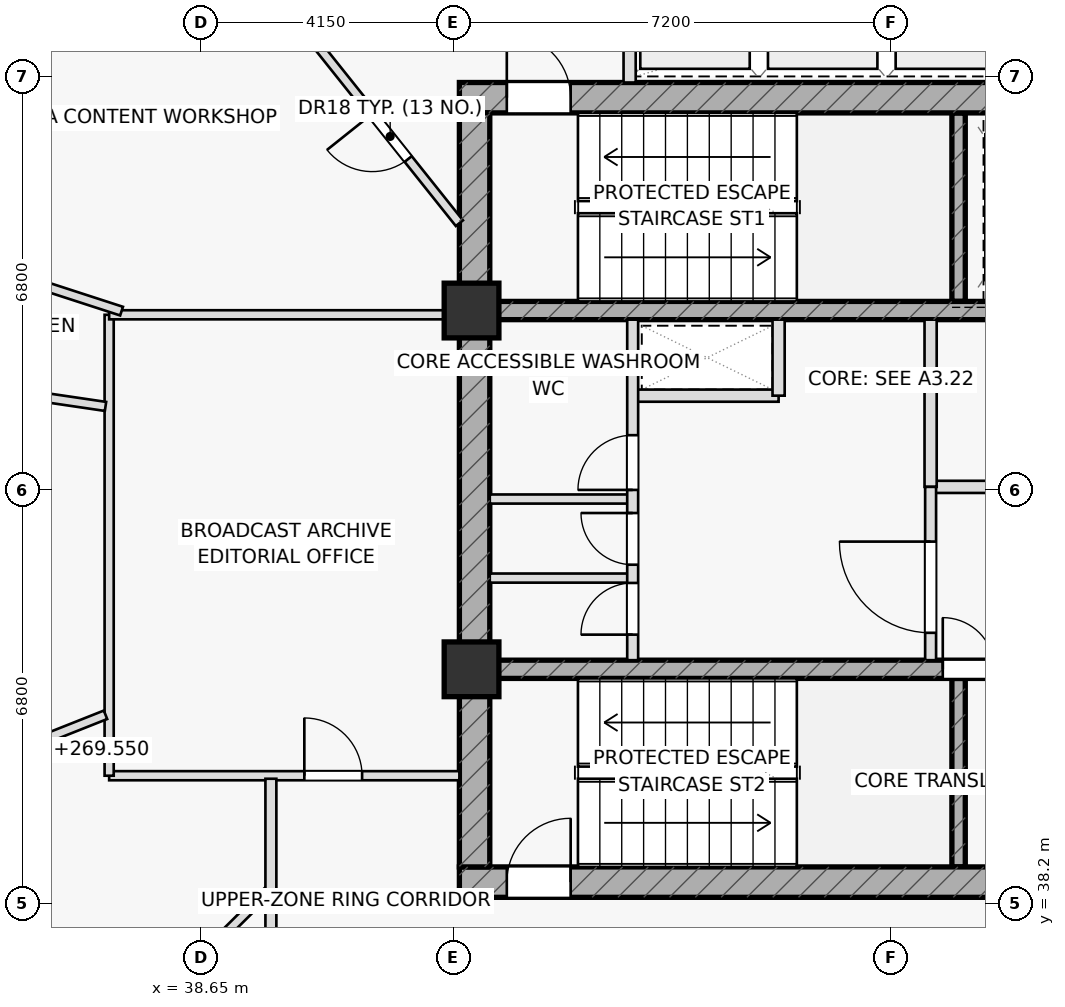
"""IFC4 building model, lengths in metres.
Left out: names, types, materials, properties, quantities, classifications, styles, units other than length and angle.
Written with IfcOpenShell. Run it as: python <this file> out.ifc"""

import sys

from ifc_helpers import new_model, si_unit, direction, frame, frame_2d, origin, origin_2d, place, context, subcontext, project, spatial, rectangle, extrude, element, fill, save


model = new_model("IFC4")
c1 = context("Model", 3, precision=1e-05, world=origin(), true_north=direction((0.0, 1.0)))
c2 = subcontext(c1, "Body", "Model", "MODEL_VIEW")
j1 = project(units=[si_unit("LENGTHUNIT", "METRE"), si_unit("PLANEANGLEUNIT", "RADIAN")], contexts=[c1])
p1 = place(None, origin())
s1 = spatial("IfcSite", under=j1, at=p1, CompositionType="ELEMENT")
p2 = place(p1, origin())
s2 = spatial("IfcBuilding", under=s1, at=p2, CompositionType="ELEMENT")
p3 = place(p2, frame((0.0, 0.0, 269.55)))
s3 = spatial("IfcBuildingStorey", under=s2, at=p3, CompositionType="ELEMENT", Elevation=269.55)
for number, where, z_axis, x_axis in (
    (1, (51.11, 48.1, 0.0), (0.0, 0.0, 1.0), (0.0, 1.0, 0.0)),
    (2, (51.11, 38.8, 0.0), (0.0, 0.0, 1.0), (0.0, 1.0, 0.0)),
):
    element("IfcWall", number, at=place(p3, frame(where, z_axis=z_axis, x_axis=x_axis)), inside=s3, PredefinedType="SHEAR", context=c2, shape_type="SweptSolid", body=[
        extrude(rectangle(XDim=3.1, YDim=0.22, at=frame_2d((1.55, 0.0))), origin(), (0.0, 0.0, 1.0), 3.5),
    ])
p4 = place(p3, frame((42.9, 51.45, 0.0), z_axis=(0.0, 0.0, 1.0), x_axis=(1.0, 0.0, 0.0)))
e3 = element("IfcWall", 3, at=p4, inside=s3, PredefinedType="SHEAR", context=c2, shape_type="SweptSolid", body=[
    extrude(rectangle(XDim=14.2, YDim=0.5, at=frame_2d((7.1, 0.0))), origin(), (0.0, 0.0, 1.0), 3.5),
])
p5 = place(p4, frame((0.78, 0.0, 0.0)))
e4 = element("IfcOpeningElement", 4, at=p5, cuts=e3, PredefinedType="OPENING", context=c2, shape_type="SweptSolid", body=[
    extrude(rectangle(XDim=1.05, YDim=2.2, at=frame_2d((0.525, 1.1))), frame((0.0, 0.26, 0.0), z_axis=(0.0, -1.0, 0.0), x_axis=(1.0, 0.0, 0.0)), (0.0, 0.0, 1.0), 0.52),
])
p6 = place(p3, frame((42.9, 38.55, 0.0), z_axis=(0.0, 0.0, 1.0), x_axis=(1.0, 0.0, 0.0)))
e5 = element("IfcWall", 5, at=p6, inside=s3, PredefinedType="SHEAR", context=c2, shape_type="SweptSolid", body=[
    extrude(rectangle(XDim=14.2, YDim=0.5, at=frame_2d((7.1, 0.0))), origin(), (0.0, 0.0, 1.0), 3.5),
])
p7 = place(p6, frame((0.78, 0.0, 0.0)))
e6 = element("IfcOpeningElement", 6, at=p7, cuts=e5, PredefinedType="OPENING", context=c2, shape_type="SweptSolid", body=[
    extrude(rectangle(XDim=1.05, YDim=2.2, at=frame_2d((0.525, 1.1))), frame((0.0, 0.26, 0.0), z_axis=(0.0, -1.0, 0.0), x_axis=(1.0, 0.0, 0.0)), (0.0, 0.0, 1.0), 0.52),
])
p8 = place(p3, frame((43.15, 38.8, 0.0), z_axis=(0.0, 0.0, 1.0), x_axis=(0.0, 1.0, 0.0)))
e7 = element("IfcWall", 7, at=p8, inside=s3, PredefinedType="SHEAR", context=c2, shape_type="SweptSolid", body=[
    extrude(rectangle(XDim=12.4, YDim=0.5, at=frame_2d((6.2, 0.0))), origin(), (0.0, 0.0, 1.0), 3.5),
])
p9 = place(p3, frame((43.4, 47.95, 0.0), z_axis=(0.0, 0.0, 1.0), x_axis=(1.0, 0.0, 0.0)))
e8 = element("IfcWall", 8, at=p9, inside=s3, PredefinedType="SHEAR", context=c2, shape_type="SweptSolid", body=[
    extrude(rectangle(XDim=13.2, YDim=0.3, at=frame_2d((6.6, 0.0))), origin(), (0.0, 0.0, 1.0), 3.5),
])
p10 = place(p9, frame((8.345, 0.0, 0.0)))
e9 = element("IfcOpeningElement", 9, at=p10, cuts=e8, PredefinedType="OPENING", context=c2, shape_type="SweptSolid", body=[
    extrude(rectangle(XDim=1.15, YDim=2.2, at=frame_2d((0.575, 1.1))), frame((0.0, 0.16, 0.0), z_axis=(0.0, -1.0, 0.0), x_axis=(1.0, 0.0, 0.0)), (0.0, 0.0, 1.0), 0.32),
])
p11 = place(p9, frame((10.065, 0.0, 0.0)))
e10 = element("IfcOpeningElement", 10, at=p11, cuts=e8, PredefinedType="OPENING", context=c2, shape_type="SweptSolid", body=[
    extrude(rectangle(XDim=1.15, YDim=2.2, at=frame_2d((0.575, 1.1))), frame((0.0, 0.16, 0.0), z_axis=(0.0, -1.0, 0.0), x_axis=(1.0, 0.0, 0.0)), (0.0, 0.0, 1.0), 0.32),
])
p12 = place(p9, frame((11.645, 0.0, 0.0)))
e11 = element("IfcOpeningElement", 11, at=p12, cuts=e8, PredefinedType="OPENING", context=c2, shape_type="SweptSolid", body=[
    extrude(rectangle(XDim=1.15, YDim=2.2, at=frame_2d((0.575, 1.1))), frame((0.0, 0.16, 0.0), z_axis=(0.0, -1.0, 0.0), x_axis=(1.0, 0.0, 0.0)), (0.0, 0.0, 1.0), 0.32),
])
p13 = place(p3, frame((43.4, 42.05, 0.0), z_axis=(0.0, 0.0, 1.0), x_axis=(1.0, 0.0, 0.0)))
e12 = element("IfcWall", 12, at=p13, inside=s3, PredefinedType="SHEAR", context=c2, shape_type="SweptSolid", body=[
    extrude(rectangle(XDim=13.2, YDim=0.3, at=frame_2d((6.6, 0.0))), origin(), (0.0, 0.0, 1.0), 3.5),
])
p14 = place(p13, frame((7.45, 0.0, 0.0)))
e13 = element("IfcOpeningElement", 13, at=p14, cuts=e12, PredefinedType="OPENING", context=c2, shape_type="SweptSolid", body=[
    extrude(rectangle(XDim=0.85, YDim=2.05, at=frame_2d((0.425, 1.025))), frame((0.0, 0.16, 0.0), z_axis=(0.0, -1.0, 0.0), x_axis=(1.0, 0.0, 0.0)), (0.0, 0.0, 1.0), 0.32),
])
p15 = place(p13, frame((9.5, 0.0, 0.0)))
e14 = element("IfcOpeningElement", 14, at=p15, cuts=e12, PredefinedType="OPENING", context=c2, shape_type="SweptSolid", body=[
    extrude(rectangle(XDim=0.85, YDim=2.05, at=frame_2d((0.425, 1.025))), frame((0.0, 0.16, 0.0), z_axis=(0.0, -1.0, 0.0), x_axis=(1.0, 0.0, 0.0)), (0.0, 0.0, 1.0), 0.32),
])
p16 = place(p13, frame((11.6, 0.0, 0.0)))
e15 = element("IfcOpeningElement", 15, at=p16, cuts=e12, PredefinedType="OPENING", context=c2, shape_type="SweptSolid", body=[
    extrude(rectangle(XDim=0.85, YDim=2.05, at=frame_2d((0.425, 1.025))), frame((0.0, 0.16, 0.0), z_axis=(0.0, -1.0, 0.0), x_axis=(1.0, 0.0, 0.0)), (0.0, 0.0, 1.0), 0.32),
])
for number, where, z_axis, x_axis in (
    (16, (43.1, 47.95, 0.0), (0.0, 0.0, 1.0), (1.0, 0.0, 0.0)),
    (17, (43.1, 42.05, 0.0), (0.0, 0.0, 1.0), (1.0, 0.0, 0.0)),
):
    element("IfcColumn", number, at=place(p3, frame(where, z_axis=z_axis, x_axis=x_axis)), inside=s3, PredefinedType="COLUMN", context=c2, shape_type="SweptSolid", body=[
        extrude(rectangle(XDim=0.9, YDim=0.9, at=origin_2d()), origin(), (0.0, 0.0, 1.0), 3.5),
    ])
p17 = place(p3, frame((45.7, 51.7, 0.0), z_axis=(0.0, 0.0, 1.0), x_axis=(0.0, 1.0, 0.0)))
e18 = element("IfcWall", 18, at=p17, inside=s3, PredefinedType="PARTITIONING", context=c2, shape_type="SweptSolid", body=[
    extrude(rectangle(XDim=2.6, YDim=0.2, at=frame_2d((1.3, 0.0))), origin(), (0.0, 0.0, 1.0), 3.5),
])
p18 = place(p3, frame((45.75, 46.55, 0.0), z_axis=(0.0, 0.0, 1.0), x_axis=(1.0, 0.0, 0.0)))
e19 = element("IfcWall", 19, at=p18, inside=s3, PredefinedType="PARTITIONING", context=c2, shape_type="SweptSolid", body=[
    extrude(rectangle(XDim=2.4, YDim=0.2, at=frame_2d((1.2, 0.0))), origin(), (0.0, 0.0, 1.0), 3.5),
])
p19 = place(p3, frame((48.15, 46.55, 0.0), z_axis=(0.0, 0.0, 1.0), x_axis=(0.0, 1.0, 0.0)))
e20 = element("IfcWall", 20, at=p19, inside=s3, PredefinedType="PARTITIONING", context=c2, shape_type="SweptSolid", body=[
    extrude(rectangle(XDim=1.25, YDim=0.2, at=frame_2d((0.625, 0.0))), origin(), (0.0, 0.0, 1.0), 3.5),
])
p20 = place(p3, frame((50.65, 45.05, 0.0), z_axis=(0.0, 0.0, 1.0), x_axis=(1.0, 0.0, 0.0)))
e21 = element("IfcWall", 21, at=p20, inside=s3, PredefinedType="PARTITIONING", context=c2, shape_type="SweptSolid", body=[
    extrude(rectangle(XDim=5.95, YDim=0.2, at=frame_2d((2.975, 0.0))), origin(), (0.0, 0.0, 1.0), 3.5),
])
p21 = place(p20, frame((1.35, 0.0, 0.0)))
e22 = element("IfcOpeningElement", 22, at=p21, cuts=e21, PredefinedType="OPENING", context=c2, shape_type="SweptSolid", body=[
    extrude(rectangle(XDim=1.5, YDim=2.2, at=frame_2d((0.75, 1.1))), frame((0.0, 0.11, 0.0), z_axis=(0.0, -1.0, 0.0), x_axis=(1.0, 0.0, 0.0)), (0.0, 0.0, 1.0), 0.22),
])
p22 = place(p3, frame((50.65, 45.05, 0.0), z_axis=(0.0, 0.0, 1.0), x_axis=(0.0, 1.0, 0.0)))
e23 = element("IfcWall", 23, at=p22, inside=s3, PredefinedType="PARTITIONING", context=c2, shape_type="SweptSolid", body=[
    extrude(rectangle(XDim=2.75, YDim=0.2, at=frame_2d((1.375, 0.0))), origin(), (0.0, 0.0, 1.0), 3.5),
])
p23 = place(p3, frame((50.65, 42.2, 0.0), z_axis=(0.0, 0.0, 1.0), x_axis=(0.0, 1.0, 0.0)))
e24 = element("IfcWall", 24, at=p23, inside=s3, PredefinedType="PARTITIONING", context=c2, shape_type="SweptSolid", body=[
    extrude(rectangle(XDim=2.85, YDim=0.18, at=frame_2d((1.425, 0.0))), origin(), (0.0, 0.0, 1.0), 3.5),
])
p24 = place(p23, frame((0.45, 0.0, 0.0)))
e25 = element("IfcOpeningElement", 25, at=p24, cuts=e24, PredefinedType="OPENING", context=c2, shape_type="SweptSolid", body=[
    extrude(rectangle(XDim=1.5, YDim=2.2, at=frame_2d((0.75, 1.1))), frame((0.0, 0.1, 0.0), z_axis=(0.0, -1.0, 0.0), x_axis=(1.0, 0.0, 0.0)), (0.0, 0.0, 1.0), 0.2),
])
for number, where, z_axis, x_axis in (
    (26, (43.4, 43.55, 0.0), (0.0, 0.0, 1.0), (1.0, 0.0, 0.0)),
    (27, (43.4, 44.85, 0.0), (0.0, 0.0, 1.0), (1.0, 0.0, 0.0)),
):
    element("IfcWall", number, at=place(p3, frame(where, z_axis=z_axis, x_axis=x_axis)), inside=s3, PredefinedType="PARTITIONING", context=c2, shape_type="SweptSolid", body=[
        extrude(rectangle(XDim=2.35, YDim=0.15, at=frame_2d((1.175, 0.0))), origin(), (0.0, 0.0, 1.0), 3.5),
    ])
p25 = place(p3, frame((45.75, 42.2, 0.0), z_axis=(0.0, 0.0, 1.0), x_axis=(0.0, 1.0, 0.0)))
e28 = element("IfcWall", 28, at=p25, inside=s3, PredefinedType="PARTITIONING", context=c2, shape_type="SweptSolid", body=[
    extrude(rectangle(XDim=5.6, YDim=0.18, at=frame_2d((2.8, 0.0))), origin(), (0.0, 0.0, 1.0), 3.5),
])
p26 = place(p25, frame((0.42, 0.0, 0.0)))
e29 = element("IfcOpeningElement", 29, at=p26, cuts=e28, PredefinedType="OPENING", context=c2, shape_type="SweptSolid", body=[
    extrude(rectangle(XDim=0.85, YDim=2.05, at=frame_2d((0.425, 1.025))), frame((0.0, 0.1, 0.0), z_axis=(0.0, -1.0, 0.0), x_axis=(1.0, 0.0, 0.0)), (0.0, 0.0, 1.0), 0.2),
])
p27 = place(p25, frame((1.57, 0.0, 0.0)))
e30 = element("IfcOpeningElement", 30, at=p27, cuts=e28, PredefinedType="OPENING", context=c2, shape_type="SweptSolid", body=[
    extrude(rectangle(XDim=0.85, YDim=2.05, at=frame_2d((0.425, 1.025))), frame((0.0, 0.1, 0.0), z_axis=(0.0, -1.0, 0.0), x_axis=(1.0, 0.0, 0.0)), (0.0, 0.0, 1.0), 0.2),
])
p28 = place(p25, frame((2.8, 0.0, 0.0)))
e31 = element("IfcOpeningElement", 31, at=p28, cuts=e28, PredefinedType="OPENING", context=c2, shape_type="SweptSolid", body=[
    extrude(rectangle(XDim=0.9, YDim=2.05, at=frame_2d((0.45, 1.025))), frame((0.0, 0.1, 0.0), z_axis=(0.0, -1.0, 0.0), x_axis=(1.0, 0.0, 0.0)), (0.0, 0.0, 1.0), 0.2),
])
p29 = place(p3, frame((37.14, 40.3, 0.0), z_axis=(0.0, 0.0, 1.0), x_axis=(1.0, 0.0, 0.0)))
e32 = element("IfcWall", 32, at=p29, inside=s3, PredefinedType="PARTITIONING", context=c2, shape_type="SweptSolid", body=[
    extrude(rectangle(XDim=5.76, YDim=0.15, at=frame_2d((2.88, 0.0))), origin(), (0.0, 0.0, 1.0), 2.195),
])
p30 = place(p29, frame((3.21, 0.0, 0.0)))
e33 = element("IfcOpeningElement", 33, at=p30, cuts=e32, PredefinedType="OPENING", context=c2, shape_type="SweptSolid", body=[
    extrude(rectangle(XDim=0.95, YDim=2.05, at=frame_2d((0.475, 1.025))), frame((0.0, 0.085, 0.0), z_axis=(0.0, -1.0, 0.0), x_axis=(1.0, 0.0, 0.0)), (0.0, 0.0, 1.0), 0.17),
])
p31 = place(p3, frame((37.14, 40.3, 0.0), z_axis=(0.0, 0.0, 1.0), x_axis=(0.0, 1.0, 0.0)))
e34 = element("IfcWall", 34, at=p31, inside=s3, PredefinedType="PARTITIONING", context=c2, shape_type="SweptSolid", body=[
    extrude(rectangle(XDim=7.58, YDim=0.15, at=frame_2d((3.79, 0.0))), origin(), (0.0, 0.0, 1.0), 2.195),
])
p32 = place(p3, frame((37.14, 47.88, 0.0), z_axis=(0.0, 0.0, 1.0), x_axis=(1.0, 0.0, 0.0)))
e35 = element("IfcWall", 35, at=p32, inside=s3, PredefinedType="PARTITIONING", context=c2, shape_type="SweptSolid", body=[
    extrude(rectangle(XDim=5.76, YDim=0.15, at=frame_2d((2.88, 0.0))), origin(), (0.0, 0.0, 1.0), 2.195),
])
p33 = place(p3, frame((42.9, 49.386, 0.0), z_axis=(0.0, 0.0, 1.0), x_axis=(-0.623701083896, 0.781662943951, 0.0)))
e36 = element("IfcWall", 36, at=p33, inside=s3, PredefinedType="PARTITIONING", context=c2, shape_type="SweptSolid", body=[
    extrude(rectangle(XDim=17.652, YDim=0.15, at=frame_2d((8.826, 0.0))), origin(), (0.0, 0.0, 1.0), 2.195),
])
p34 = place(p33, frame((1.35, 0.0, 0.0)))
e37 = element("IfcOpeningElement", 37, at=p34, cuts=e36, PredefinedType="OPENING", context=c2, shape_type="SweptSolid", body=[
    extrude(rectangle(XDim=0.95, YDim=2.05, at=frame_2d((0.475, 1.025))), frame((0.0, 0.085, 0.0), z_axis=(0.0, -1.0, 0.0), x_axis=(1.0, 0.0, 0.0)), (0.0, 0.0, 1.0), 0.17),
])
p35 = place(p3, frame((37.344, 47.94, 0.0), z_axis=(0.0, 0.0, 1.0), x_axis=(-0.951127968225, 0.308797001379, 0.0)))
e38 = element("IfcWall", 38, at=p35, inside=s3, PredefinedType="PARTITIONING", context=c2, shape_type="SweptSolid", body=[
    extrude(rectangle(XDim=13.235, YDim=0.15, at=frame_2d((6.617, 0.0))), origin(), (0.0, 0.0, 1.0), 2.195),
])
p36 = place(p3, frame((37.08, 46.373, 0.0), z_axis=(0.0, 0.0, 1.0), x_axis=(-0.989323142892, 0.145738529351, 0.0)))
e39 = element("IfcWall", 39, at=p36, inside=s3, PredefinedType="PARTITIONING", context=c2, shape_type="SweptSolid", body=[
    extrude(rectangle(XDim=11.698, YDim=0.15, at=frame_2d((5.849, 0.0))), origin(), (0.0, 0.0, 1.0), 2.195),
])
p37 = place(p36, frame((3.15, 0.0, 0.0)))
e40 = element("IfcOpeningElement", 40, at=p37, cuts=e39, PredefinedType="OPENING", context=c2, shape_type="SweptSolid", body=[
    extrude(rectangle(XDim=0.95, YDim=2.05, at=frame_2d((0.475, 1.025))), frame((0.0, 0.085, 0.0), z_axis=(0.0, -1.0, 0.0), x_axis=(1.0, 0.0, 0.0)), (0.0, 0.0, 1.0), 0.17),
])
p38 = place(p3, frame((37.08, 41.302, 0.0), z_axis=(0.0, 0.0, 1.0), x_axis=(-0.929499264933, -0.368823964092, 0.0)))
e41 = element("IfcWall", 41, at=p38, inside=s3, PredefinedType="PARTITIONING", context=c2, shape_type="SweptSolid", body=[
    extrude(rectangle(XDim=9.008, YDim=0.15, at=frame_2d((4.504, 0.0))), origin(), (0.0, 0.0, 1.0), 2.195),
])
p39 = place(p38, frame((2.55, 0.0, 0.0)))
e42 = element("IfcOpeningElement", 42, at=p39, cuts=e41, PredefinedType="OPENING", context=c2, shape_type="SweptSolid", body=[
    extrude(rectangle(XDim=0.95, YDim=2.05, at=frame_2d((0.475, 1.025))), frame((0.0, 0.085, 0.0), z_axis=(0.0, -1.0, 0.0), x_axis=(1.0, 0.0, 0.0)), (0.0, 0.0, 1.0), 0.17),
])
p40 = place(p3, frame((39.8, 38.45, 0.0), z_axis=(0.0, 0.0, 1.0), x_axis=(-0.70980455897, -0.704398671254, 0.0)))
e43 = element("IfcWall", 43, at=p40, inside=s3, PredefinedType="PARTITIONING", context=c2, shape_type="SweptSolid", body=[
    extrude(rectangle(XDim=10.613, YDim=0.15, at=frame_2d((5.307, 0.0))), origin(), (0.0, 0.0, 1.0), 2.195),
])
p41 = place(p40, frame((1.35, 0.0, 0.0)))
e44 = element("IfcOpeningElement", 44, at=p41, cuts=e43, PredefinedType="OPENING", context=c2, shape_type="SweptSolid", body=[
    extrude(rectangle(XDim=0.95, YDim=2.05, at=frame_2d((0.475, 1.025))), frame((0.0, 0.085, 0.0), z_axis=(0.0, -1.0, 0.0), x_axis=(1.0, 0.0, 0.0)), (0.0, 0.0, 1.0), 0.17),
])
p42 = place(p3, frame((39.8, 36.17, 0.0), z_axis=(0.0, 0.0, 1.0), x_axis=(0.0, 1.0, 0.0)))
e45 = element("IfcWall", 45, at=p42, inside=s3, PredefinedType="PARTITIONING", context=c2, shape_type="SweptSolid", body=[
    extrude(rectangle(XDim=4.08, YDim=0.18, at=frame_2d((2.04, 0.0))), origin(), (0.0, 0.0, 1.0), 2.195),
])
p43 = place(p5, origin())
e46 = element("IfcDoor", 46, at=p43, inside=s3, OperationType="SINGLE_SWING_LEFT", PredefinedType="DOOR", context=c2, shape_type="SweptSolid", body=[
    extrude(rectangle(XDim=1.05, YDim=2.2, at=frame_2d((0.525, 1.1))), frame((0.0, 0.025, 0.0), z_axis=(0.0, -1.0, 0.0), x_axis=(1.0, 0.0, 0.0)), (0.0, 0.0, 1.0), 0.05),
])
fill(e4, e46)
p44 = place(p7, origin())
e47 = element("IfcDoor", 47, at=p44, inside=s3, OperationType="SINGLE_SWING_RIGHT", PredefinedType="DOOR", context=c2, shape_type="SweptSolid", body=[
    extrude(rectangle(XDim=1.05, YDim=2.2, at=frame_2d((0.525, 1.1))), frame((0.0, 0.025, 0.0), z_axis=(0.0, -1.0, 0.0), x_axis=(1.0, 0.0, 0.0)), (0.0, 0.0, 1.0), 0.05),
])
fill(e6, e47)
p45 = place(p24, origin())
e48 = element("IfcDoor", 48, at=p45, inside=s3, OperationType="SINGLE_SWING_RIGHT", PredefinedType="DOOR", context=c2, shape_type="SweptSolid", body=[
    extrude(rectangle(XDim=1.5, YDim=2.2, at=frame_2d((0.75, 1.1))), frame((0.0, 0.025, 0.0), z_axis=(0.0, -1.0, 0.0), x_axis=(1.0, 0.0, 0.0)), (0.0, 0.0, 1.0), 0.05),
])
fill(e25, e48)
p46 = place(p14, origin())
e49 = element("IfcDoor", 49, at=p46, inside=s3, OperationType="SINGLE_SWING_LEFT", PredefinedType="DOOR", context=c2, shape_type="SweptSolid", body=[
    extrude(rectangle(XDim=0.85, YDim=2.05, at=frame_2d((0.425, 1.025))), frame((0.0, 0.025, 0.0), z_axis=(0.0, -1.0, 0.0), x_axis=(1.0, 0.0, 0.0)), (0.0, 0.0, 1.0), 0.05),
])
fill(e13, e49)
p47 = place(p26, origin())
e50 = element("IfcDoor", 50, at=p47, inside=s3, OperationType="SINGLE_SWING_LEFT", PredefinedType="DOOR", context=c2, shape_type="SweptSolid", body=[
    extrude(rectangle(XDim=0.85, YDim=2.05, at=frame_2d((0.425, 1.025))), frame((0.0, 0.025, 0.0), z_axis=(0.0, -1.0, 0.0), x_axis=(1.0, 0.0, 0.0)), (0.0, 0.0, 1.0), 0.05),
])
fill(e29, e50)
p48 = place(p27, origin())
e51 = element("IfcDoor", 51, at=p48, inside=s3, OperationType="SINGLE_SWING_RIGHT", PredefinedType="DOOR", context=c2, shape_type="SweptSolid", body=[
    extrude(rectangle(XDim=0.85, YDim=2.05, at=frame_2d((0.425, 1.025))), frame((0.0, 0.025, 0.0), z_axis=(0.0, -1.0, 0.0), x_axis=(1.0, 0.0, 0.0)), (0.0, 0.0, 1.0), 0.05),
])
fill(e30, e51)
p49 = place(p28, origin())
e52 = element("IfcDoor", 52, at=p49, inside=s3, OperationType="SINGLE_SWING_LEFT", PredefinedType="DOOR", context=c2, shape_type="SweptSolid", body=[
    extrude(rectangle(XDim=0.9, YDim=2.05, at=frame_2d((0.45, 1.025))), frame((0.0, 0.025, 0.0), z_axis=(0.0, -1.0, 0.0), x_axis=(1.0, 0.0, 0.0)), (0.0, 0.0, 1.0), 0.05),
])
fill(e31, e52)
p50 = place(p30, origin())
e53 = element("IfcDoor", 53, at=p50, inside=s3, OperationType="SINGLE_SWING_LEFT", PredefinedType="DOOR", context=c2, shape_type="SweptSolid", body=[
    extrude(rectangle(XDim=0.95, YDim=2.05, at=frame_2d((0.475, 1.025))), frame((0.0, 0.025, 0.0), z_axis=(0.0, -1.0, 0.0), x_axis=(1.0, 0.0, 0.0)), (0.0, 0.0, 1.0), 0.05),
])
fill(e33, e53)
p51 = place(p34, origin())
e54 = element("IfcDoor", 54, at=p51, inside=s3, OperationType="SINGLE_SWING_RIGHT", PredefinedType="DOOR", context=c2, shape_type="SweptSolid", body=[
    extrude(rectangle(XDim=0.95, YDim=2.05, at=frame_2d((0.475, 1.025))), frame((0.0, 0.025, 0.0), z_axis=(0.0, -1.0, 0.0), x_axis=(1.0, 0.0, 0.0)), (0.0, 0.0, 1.0), 0.05),
])
fill(e37, e54)
save(model, sys.argv[1])
